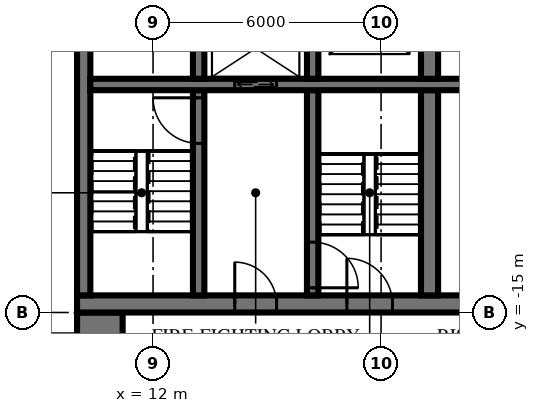
"""IFC4 building model, lengths in metres.
Left out: names, types, materials, properties, quantities, classifications, styles, units other than length and angle.
Written with IfcOpenShell. Run it as: python <this file> out.ifc"""

import sys

from ifc_helpers import new_model, si_unit, direction, frame, frame_2d, origin, place, context, subcontext, project, spatial, rectangle, extrude, element, fill, save


model = new_model("IFC4")
c1 = context("Model", 3, precision=1e-05, world=origin(), true_north=direction((0.0, 1.0)))
c2 = subcontext(c1, "Body", "Model", "MODEL_VIEW")
j1 = project(units=[si_unit("LENGTHUNIT", "METRE"), si_unit("PLANEANGLEUNIT", "RADIAN")], contexts=[c1])
p1 = place(None, origin())
s1 = spatial("IfcSite", under=j1, at=p1, CompositionType="ELEMENT")
p2 = place(p1, origin())
s2 = spatial("IfcBuilding", under=s1, at=p2, CompositionType="ELEMENT")
p3 = place(p2, frame((0.0, 0.0, 12.5)))
s3 = spatial("IfcBuildingStorey", under=s2, at=p3, CompositionType="ELEMENT", Elevation=12.5)
p4 = place(p3, frame((10.0, -14.775, 0.0), z_axis=(0.0, 0.0, 1.0), x_axis=(1.0, 0.0, 0.0)))
e1 = element("IfcWall", 1, at=p4, inside=s3, PredefinedType="SHEAR", context=c2, shape_type="SweptSolid", body=[
    extrude(rectangle(XDim=19.5, YDim=0.45, at=frame_2d((9.75, 0.0))), origin(), (0.0, 0.0, 1.0), 5.5),
])
p5 = place(p4, frame((7.1, 0.0, 0.0)))
e2 = element("IfcOpeningElement", 2, at=p5, cuts=e1, PredefinedType="OPENING", context=c2, shape_type="SweptSolid", body=[
    extrude(rectangle(XDim=1.2, YDim=2.1, at=frame_2d((0.6, 1.05))), frame((0.0, 0.235, 0.0), z_axis=(0.0, -1.0, 0.0), x_axis=(1.0, 0.0, 0.0)), (0.0, 0.0, 1.0), 0.47),
])
p6 = place(p4, frame((4.15, 0.0, 0.0)))
e3 = element("IfcOpeningElement", 3, at=p6, cuts=e1, PredefinedType="OPENING", context=c2, shape_type="SweptSolid", body=[
    extrude(rectangle(XDim=1.1, YDim=2.1, at=frame_2d((0.55, 1.05))), frame((0.0, 0.235, 0.0), z_axis=(0.0, -1.0, 0.0), x_axis=(1.0, 0.0, 0.0)), (0.0, 0.0, 1.0), 0.47),
])
p7 = place(p4, frame((10.1, 0.0, 0.0)))
e4 = element("IfcOpeningElement", 4, at=p7, cuts=e1, PredefinedType="OPENING", context=c2, shape_type="SweptSolid", body=[
    extrude(rectangle(XDim=0.9, YDim=2.1, at=frame_2d((0.45, 1.05))), frame((0.0, 0.235, 0.0), z_axis=(0.0, -1.0, 0.0), x_axis=(1.0, 0.0, 0.0)), (0.0, 0.0, 1.0), 0.47),
])
p8 = place(p4, frame((12.45, 0.0, 0.0)))
e5 = element("IfcOpeningElement", 5, at=p8, cuts=e1, PredefinedType="OPENING", context=c2, shape_type="SweptSolid", body=[
    extrude(rectangle(XDim=1.0, YDim=2.1, at=frame_2d((0.5, 1.05))), frame((0.0, 0.235, 0.0), z_axis=(0.0, -1.0, 0.0), x_axis=(1.0, 0.0, 0.0)), (0.0, 0.0, 1.0), 0.47),
])
p9 = place(p4, frame((15.087, 0.0, 0.0)))
e6 = element("IfcOpeningElement", 6, at=p9, cuts=e1, PredefinedType="OPENING", context=c2, shape_type="SweptSolid", body=[
    extrude(rectangle(XDim=1.0, YDim=2.1, at=frame_2d((0.5, 1.05))), frame((0.0, 0.235, 0.0), z_axis=(0.0, -1.0, 0.0), x_axis=(1.0, 0.0, 0.0)), (0.0, 0.0, 1.0), 0.47),
])
p10 = place(p4, frame((17.413, 0.0, 0.0)))
e7 = element("IfcOpeningElement", 7, at=p10, cuts=e1, PredefinedType="OPENING", context=c2, shape_type="SweptSolid", body=[
    extrude(rectangle(XDim=1.0, YDim=2.1, at=frame_2d((0.5, 1.05))), frame((0.0, 0.235, 0.0), z_axis=(0.0, -1.0, 0.0), x_axis=(1.0, 0.0, 0.0)), (0.0, 0.0, 1.0), 0.47),
])
p11 = place(p3, frame((10.175, -14.55, 0.0), z_axis=(0.0, 0.0, 1.0), x_axis=(0.0, 1.0, 0.0)))
e8 = element("IfcWall", 8, at=p11, inside=s3, PredefinedType="SHEAR", context=c2, shape_type="SweptSolid", body=[
    extrude(rectangle(XDim=14.1, YDim=0.35, at=frame_2d((7.05, 0.0))), origin(), (0.0, 0.0, 1.0), 5.5),
])
p12 = place(p3, frame((10.35, -9.0, 0.0), z_axis=(0.0, 0.0, 1.0), x_axis=(1.0, 0.0, 0.0)))
e9 = element("IfcWall", 9, at=p12, inside=s3, PredefinedType="SHEAR", context=c2, shape_type="SweptSolid", body=[
    extrude(rectangle(XDim=18.7, YDim=0.3, at=frame_2d((9.35, 0.0))), origin(), (0.0, 0.0, 1.0), 5.5),
])
p13 = place(p12, frame((3.8, 0.0, 0.0)))
e10 = element("IfcOpeningElement", 10, at=p13, cuts=e9, PredefinedType="OPENING", context=c2, shape_type="SweptSolid", body=[
    extrude(rectangle(XDim=1.1, YDim=2.1, at=frame_2d((0.55, 1.05))), frame((0.0, 0.16, 0.0), z_axis=(0.0, -1.0, 0.0), x_axis=(1.0, 0.0, 0.0)), (0.0, 0.0, 1.0), 0.32),
])
p14 = place(p3, frame((13.2, -8.85, 0.0), z_axis=(0.0, 0.0, 1.0), x_axis=(0.0, 1.0, 0.0)))
e11 = element("IfcWall", 11, at=p14, inside=s3, PredefinedType="SHEAR", context=c2, shape_type="SweptSolid", body=[
    extrude(rectangle(XDim=2.3, YDim=0.3, at=frame_2d((1.15, 0.0))), origin(), (0.0, 0.0, 1.0), 5.5),
])
p15 = place(p3, frame((13.2, -14.55, 0.0), z_axis=(0.0, 0.0, 1.0), x_axis=(0.0, 1.0, 0.0)))
e12 = element("IfcWall", 12, at=p15, inside=s3, PredefinedType="SHEAR", context=c2, shape_type="SweptSolid", body=[
    extrude(rectangle(XDim=5.4, YDim=0.3, at=frame_2d((2.7, 0.0))), origin(), (0.0, 0.0, 1.0), 5.5),
])
p16 = place(p15, frame((4.0, 0.0, 0.0)))
e13 = element("IfcOpeningElement", 13, at=p16, cuts=e12, PredefinedType="OPENING", context=c2, shape_type="SweptSolid", body=[
    extrude(rectangle(XDim=1.2, YDim=2.1, at=frame_2d((0.6, 1.05))), frame((0.0, 0.16, 0.0), z_axis=(0.0, -1.0, 0.0), x_axis=(1.0, 0.0, 0.0)), (0.0, 0.0, 1.0), 0.32),
])
p17 = place(p3, frame((16.2, -8.85, 0.0), z_axis=(0.0, 0.0, 1.0), x_axis=(0.0, 1.0, 0.0)))
e14 = element("IfcWall", 14, at=p17, inside=s3, PredefinedType="SHEAR", context=c2, shape_type="SweptSolid", body=[
    extrude(rectangle(XDim=2.3, YDim=0.3, at=frame_2d((1.15, 0.0))), origin(), (0.0, 0.0, 1.0), 5.5),
])
p18 = place(p3, frame((16.2, -14.55, 0.0), z_axis=(0.0, 0.0, 1.0), x_axis=(0.0, 1.0, 0.0)))
e15 = element("IfcWall", 15, at=p18, inside=s3, PredefinedType="SHEAR", context=c2, shape_type="SweptSolid", body=[
    extrude(rectangle(XDim=5.4, YDim=0.3, at=frame_2d((2.7, 0.0))), origin(), (0.0, 0.0, 1.0), 5.5),
])
p19 = place(p18, frame((0.2, 0.0, 0.0)))
e16 = element("IfcOpeningElement", 16, at=p19, cuts=e15, PredefinedType="OPENING", context=c2, shape_type="SweptSolid", body=[
    extrude(rectangle(XDim=1.2, YDim=2.1, at=frame_2d((0.6, 1.05))), frame((0.0, 0.16, 0.0), z_axis=(0.0, -1.0, 0.0), x_axis=(1.0, 0.0, 0.0)), (0.0, 0.0, 1.0), 0.32),
])
p20 = place(p3, frame((19.275, -8.85, 0.0), z_axis=(0.0, 0.0, 1.0), x_axis=(0.0, 1.0, 0.0)))
e17 = element("IfcWall", 17, at=p20, inside=s3, PredefinedType="SHEAR", context=c2, shape_type="SweptSolid", body=[
    extrude(rectangle(XDim=2.3, YDim=0.45, at=frame_2d((1.15, 0.0))), origin(), (0.0, 0.0, 1.0), 5.5),
])
p21 = place(p3, frame((19.275, -14.55, 0.0), z_axis=(0.0, 0.0, 1.0), x_axis=(0.0, 1.0, 0.0)))
e18 = element("IfcWall", 18, at=p21, inside=s3, PredefinedType="SHEAR", context=c2, shape_type="SweptSolid", body=[
    extrude(rectangle(XDim=5.4, YDim=0.45, at=frame_2d((2.7, 0.0))), origin(), (0.0, 0.0, 1.0), 5.5),
])
p22 = place(p3, frame((10.6, -40.0, 0.0), z_axis=(0.0, 0.0, 1.0), x_axis=(0.0, 1.0, 0.0)))
e19 = element("IfcWall", 19, at=p22, inside=s3, PredefinedType="SHEAR", context=c2, shape_type="SweptSolid", body=[
    extrude(rectangle(XDim=25.0, YDim=1.2, at=frame_2d((12.5, 0.0))), origin(), (0.0, 0.0, 1.0), 5.5),
])
p23 = place(p13, origin())
e20 = element("IfcDoor", 20, at=p23, inside=s3, OperationType="DOUBLE_DOOR_SLIDING", PredefinedType="USERDEFINED", context=c2, shape_type="SweptSolid", body=[
    extrude(rectangle(XDim=1.1, YDim=2.1, at=frame_2d((0.55, 1.05))), frame((0.0, 0.025, 0.0), z_axis=(0.0, -1.0, 0.0), x_axis=(1.0, 0.0, 0.0)), (0.0, 0.0, 1.0), 0.05),
])
fill(e10, e20)
p24 = place(p5, origin())
e21 = element("IfcDoor", 21, at=p24, inside=s3, OperationType="SINGLE_SWING_RIGHT", PredefinedType="DOOR", context=c2, shape_type="SweptSolid", body=[
    extrude(rectangle(XDim=1.2, YDim=2.1, at=frame_2d((0.6, 1.05))), frame((0.0, 0.025, 0.0), z_axis=(0.0, -1.0, 0.0), x_axis=(1.0, 0.0, 0.0)), (0.0, 0.0, 1.0), 0.05),
])
fill(e2, e21)
p25 = place(p6, origin())
e22 = element("IfcDoor", 22, at=p25, inside=s3, OperationType="SINGLE_SWING_RIGHT", PredefinedType="DOOR", context=c2, shape_type="SweptSolid", body=[
    extrude(rectangle(XDim=1.1, YDim=2.1, at=frame_2d((0.55, 1.05))), frame((0.0, 0.025, 0.0), z_axis=(0.0, -1.0, 0.0), x_axis=(1.0, 0.0, 0.0)), (0.0, 0.0, 1.0), 0.05),
])
fill(e3, e22)
p26 = place(p16, origin())
e23 = element("IfcDoor", 23, at=p26, inside=s3, OperationType="SINGLE_SWING_LEFT", PredefinedType="DOOR", context=c2, shape_type="SweptSolid", body=[
    extrude(rectangle(XDim=1.2, YDim=2.1, at=frame_2d((0.6, 1.05))), frame((0.0, 0.025, 0.0), z_axis=(0.0, -1.0, 0.0), x_axis=(1.0, 0.0, 0.0)), (0.0, 0.0, 1.0), 0.05),
])
fill(e13, e23)
p27 = place(p19, frame((0.6, 0.0, 0.0), z_axis=(0.0, 0.0, 1.0), x_axis=(-1.0, 0.0, 0.0)))
e24 = element("IfcDoor", 24, at=p27, inside=s3, OperationType="SINGLE_SWING_LEFT", PredefinedType="DOOR", context=c2, shape_type="SweptSolid", body=[
    extrude(rectangle(XDim=1.2, YDim=2.1, at=frame_2d((0.0, 1.05))), frame((0.0, -0.025, 0.0), z_axis=(0.0, 1.0, 0.0), x_axis=(-1.0, 0.0, 0.0)), (0.0, 0.0, 1.0), 0.05),
])
fill(e16, e24)
save(model, sys.argv[1])
